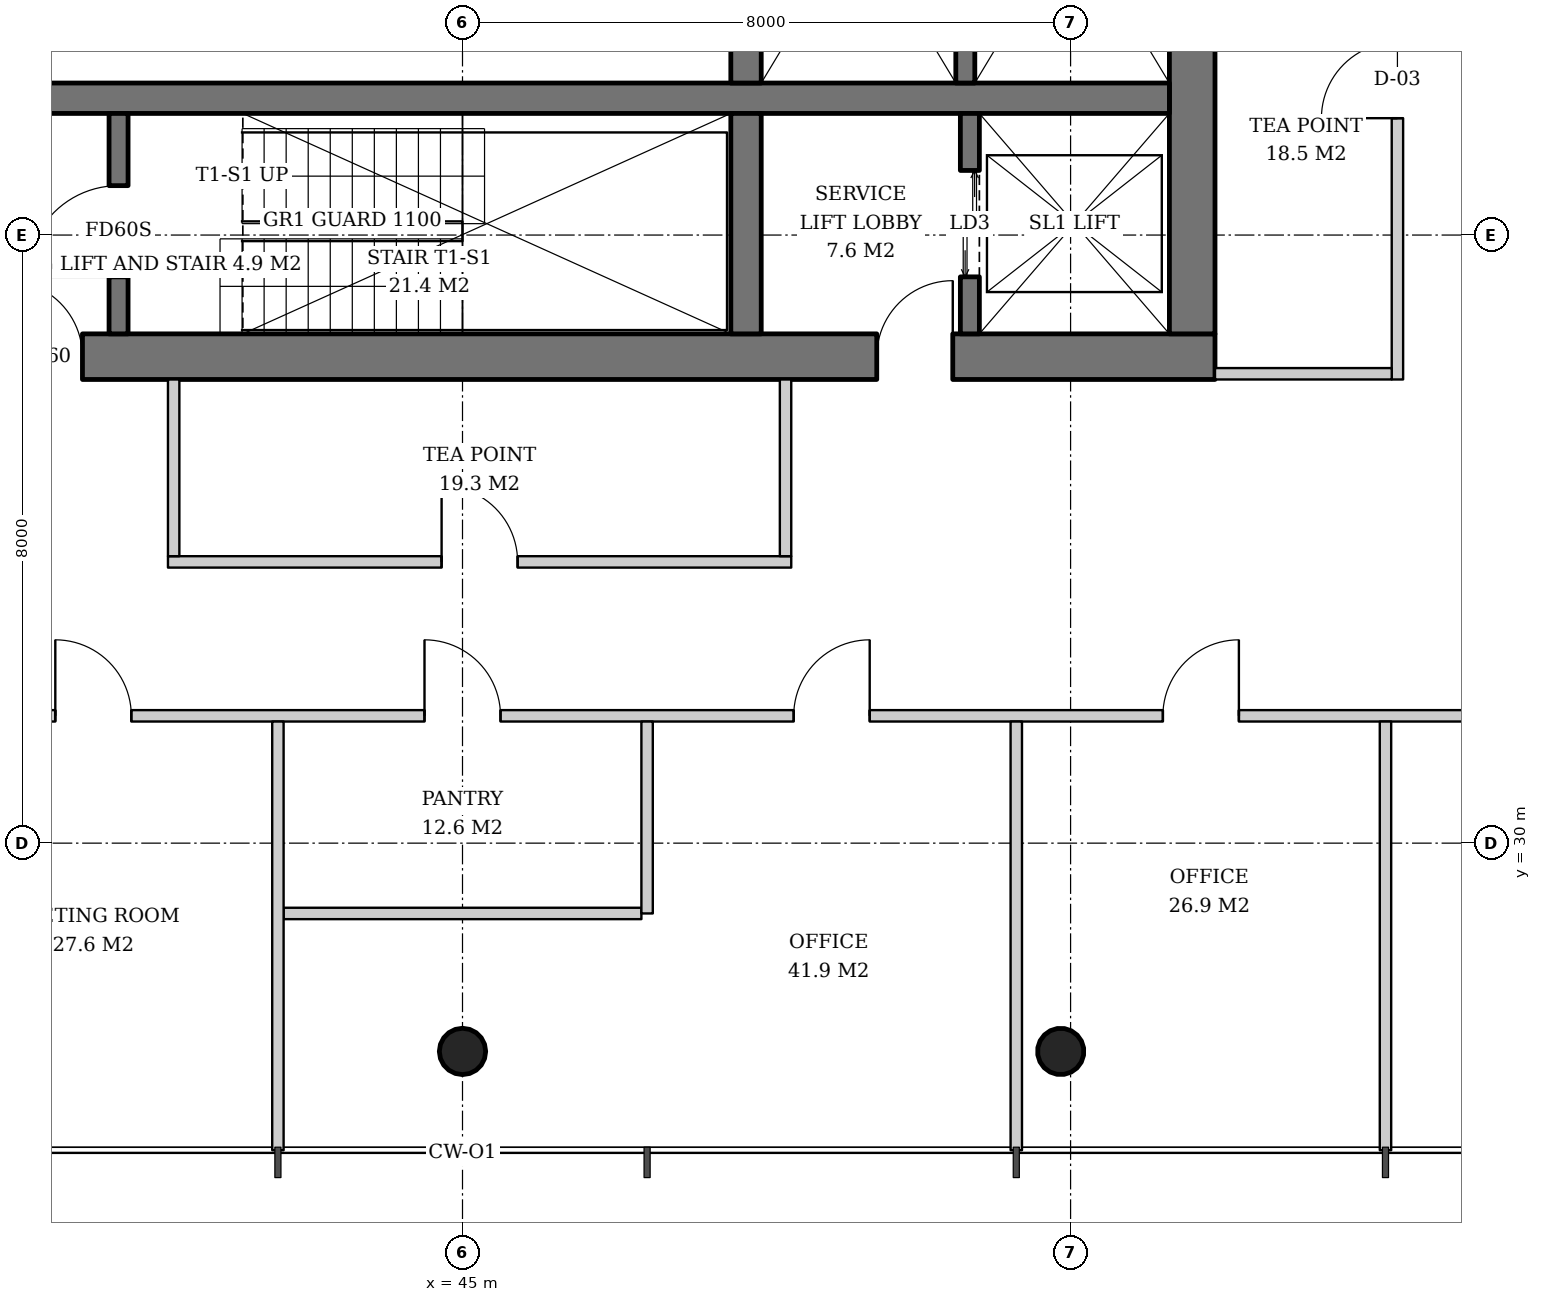
"""IFC4 building model, lengths in metres.
Left out: names, types, materials, properties, quantities, classifications, styles, units other than length and angle.
Written with IfcOpenShell. Run it as: python <this file> out.ifc"""

import sys

from ifc_helpers import new_model, si_unit, direction, frame, frame_2d, origin, origin_2d, place, context, subcontext, project, spatial, rectangle, hollow_circle, extrude, element, fill, save


model = new_model("IFC4")
c1 = context("Model", 3, precision=1e-05, world=origin(), true_north=direction((0.0, 1.0)))
c2 = subcontext(c1, "Body", "Model", "MODEL_VIEW")
j1 = project(units=[si_unit("LENGTHUNIT", "METRE"), si_unit("PLANEANGLEUNIT", "RADIAN")], contexts=[c1])
p1 = place(None, origin())
s1 = spatial("IfcSite", under=j1, at=p1, CompositionType="ELEMENT")
p2 = place(p1, origin())
s2 = spatial("IfcBuilding", under=s1, at=p2, CompositionType="ELEMENT")
p3 = place(p2, frame((0.0, 0.0, 184.4)))
s3 = spatial("IfcBuildingStorey", under=s2, at=p3, CompositionType="ELEMENT", Elevation=184.4)
p4 = place(p3, frame((45.0, 27.221, 0.0), z_axis=(0.0, 0.031914348339, 0.999490607445), x_axis=(-1.0, 0.0, 0.0)))
e1 = element("IfcColumn", 1, at=p4, inside=s3, PredefinedType="COLUMN", context=c2, shape_type="SweptSolid", body=[
    extrude(hollow_circle(Radius=0.305, WallThickness=0.025, at=origin_2d()), origin(), (0.0, 0.0, 1.0), 3.802),
])
p5 = place(p3, frame((52.889, 27.221, 0.0), z_axis=(-0.015987237665, 0.031910269556, 0.999362868496), x_axis=(-0.894067115991, -0.447933021895, 0.0)))
e2 = element("IfcColumn", 2, at=p5, inside=s3, PredefinedType="COLUMN", context=c2, shape_type="SweptSolid", body=[
    extrude(hollow_circle(Radius=0.305, WallThickness=0.025, at=origin_2d()), origin(), (0.0, 0.0, 1.0), 3.802),
])
p6 = place(p3, frame((35.1, 36.4, 0.0), z_axis=(0.0, 0.0, 1.0), x_axis=(1.0, 0.0, 0.0)))
e3 = element("IfcWall", 3, at=p6, inside=s3, PredefinedType="SHEAR", context=c2, shape_type="SweptSolid", body=[
    extrude(rectangle(XDim=19.8, YDim=0.6, at=frame_2d((9.9, 0.0))), origin(), (0.0, 0.0, 1.0), 3.8),
])
p7 = place(p6, frame((3.9, 0.0, 0.0)))
e4 = element("IfcOpeningElement", 4, at=p7, cuts=e3, PredefinedType="OPENING", context=c2, shape_type="SweptSolid", body=[
    extrude(rectangle(XDim=1.0, YDim=2.1, at=frame_2d((0.5, 1.05))), frame((0.0, 0.31, 0.0), z_axis=(0.0, -1.0, 0.0), x_axis=(1.0, 0.0, 0.0)), (0.0, 0.0, 1.0), 0.62),
])
p8 = place(p6, frame((15.35, 0.0, 0.0)))
e5 = element("IfcOpeningElement", 5, at=p8, cuts=e3, PredefinedType="OPENING", context=c2, shape_type="SweptSolid", body=[
    extrude(rectangle(XDim=1.0, YDim=2.1, at=frame_2d((0.5, 1.05))), frame((0.0, 0.31, 0.0), z_axis=(0.0, -1.0, 0.0), x_axis=(1.0, 0.0, 0.0)), (0.0, 0.0, 1.0), 0.62),
])
p9 = place(p3, frame((54.6, 36.7, 0.0), z_axis=(0.0, 0.0, 1.0), x_axis=(0.0, 1.0, 0.0)))
e6 = element("IfcWall", 6, at=p9, inside=s3, PredefinedType="SHEAR", context=c2, shape_type="SweptSolid", body=[
    extrude(rectangle(XDim=18.6, YDim=0.6, at=frame_2d((9.3, 0.0))), origin(), (0.0, 0.0, 1.0), 3.8),
])
p10 = place(p9, frame((8.4, 0.0, 0.0)))
e7 = element("IfcOpeningElement", 7, at=p10, cuts=e6, PredefinedType="OPENING", context=c2, shape_type="SweptSolid", body=[
    extrude(rectangle(XDim=1.8, YDim=2.4, at=frame_2d((0.9, 1.2))), frame((0.0, 0.31, 0.0), z_axis=(0.0, -1.0, 0.0), x_axis=(1.0, 0.0, 0.0)), (0.0, 0.0, 1.0), 0.62),
])
p11 = place(p3, frame((35.7, 39.8, 0.0), z_axis=(0.0, 0.0, 1.0), x_axis=(1.0, 0.0, 0.0)))
e8 = element("IfcWall", 8, at=p11, inside=s3, PredefinedType="SHEAR", context=c2, shape_type="SweptSolid", body=[
    extrude(rectangle(XDim=18.6, YDim=0.4, at=frame_2d((9.3, 0.0))), origin(), (0.0, 0.0, 1.0), 3.8),
])
p12 = place(p3, frame((48.73, 36.7, 0.0), z_axis=(0.0, 0.0, 1.0), x_axis=(0.0, 1.0, 0.0)))
e9 = element("IfcWall", 9, at=p12, inside=s3, PredefinedType="SHEAR", context=c2, shape_type="SweptSolid", body=[
    extrude(rectangle(XDim=2.9, YDim=0.4, at=frame_2d((1.45, 0.0))), origin(), (0.0, 0.0, 1.0), 3.8),
])
p13 = place(p3, frame((48.73, 40.0, 0.0), z_axis=(0.0, 0.0, 1.0), x_axis=(0.0, 1.0, 0.0)))
e10 = element("IfcWall", 10, at=p13, inside=s3, PredefinedType="SHEAR", context=c2, shape_type="SweptSolid", body=[
    extrude(rectangle(XDim=12.0, YDim=0.4, at=frame_2d((6.0, 0.0))), origin(), (0.0, 0.0, 1.0), 3.8),
])
p14 = place(p3, frame((40.475, 36.7, 0.0), z_axis=(0.0, 0.0, 1.0), x_axis=(0.0, 1.0, 0.0)))
e11 = element("IfcWall", 11, at=p14, inside=s3, PredefinedType="SHEAR", context=c2, shape_type="SweptSolid", body=[
    extrude(rectangle(XDim=2.9, YDim=0.25, at=frame_2d((1.45, 0.0))), origin(), (0.0, 0.0, 1.0), 3.8),
])
p15 = place(p14, frame((0.75, 0.0, 0.0)))
e12 = element("IfcOpeningElement", 12, at=p15, cuts=e11, PredefinedType="OPENING", context=c2, shape_type="SweptSolid", body=[
    extrude(rectangle(XDim=1.2, YDim=2.1, at=frame_2d((0.6, 1.05))), frame((0.0, 0.135, 0.0), z_axis=(0.0, -1.0, 0.0), x_axis=(1.0, 0.0, 0.0)), (0.0, 0.0, 1.0), 0.27),
])
p16 = place(p3, frame((51.675, 36.7, 0.0), z_axis=(0.0, 0.0, 1.0), x_axis=(0.0, 1.0, 0.0)))
e13 = element("IfcWall", 13, at=p16, inside=s3, PredefinedType="SHEAR", context=c2, shape_type="SweptSolid", body=[
    extrude(rectangle(XDim=2.9, YDim=0.25, at=frame_2d((1.45, 0.0))), origin(), (0.0, 0.0, 1.0), 3.8),
])
p17 = place(p16, frame((0.75, 0.0, 0.0)))
e14 = element("IfcOpeningElement", 14, at=p17, cuts=e13, PredefinedType="OPENING", context=c2, shape_type="SweptSolid", body=[
    extrude(rectangle(XDim=1.4, YDim=2.4, at=frame_2d((0.7, 1.2))), frame((0.0, 0.135, 0.0), z_axis=(0.0, -1.0, 0.0), x_axis=(1.0, 0.0, 0.0)), (0.0, 0.0, 1.0), 0.27),
])
p18 = place(p3, frame((51.615, 44.25, 0.0), z_axis=(0.0, 0.0, 1.0), x_axis=(0.0, -1.0, 0.0)))
e15 = element("IfcWall", 15, at=p18, inside=s3, PredefinedType="SHEAR", context=c2, shape_type="SweptSolid", body=[
    extrude(rectangle(XDim=4.25, YDim=0.25, at=frame_2d((2.125, 0.0))), origin(), (0.0, 0.0, 1.0), 3.8),
])
p19 = place(p3, frame((57.3, 36.1, 0.0), z_axis=(0.0, 0.0, 1.0), x_axis=(0.0, 1.0, 0.0)))
e16 = element("IfcWall", 16, at=p19, inside=s3, PredefinedType="PARTITIONING", context=c2, shape_type="SweptSolid", body=[
    extrude(rectangle(XDim=7.875, YDim=0.15, at=frame_2d((3.938, 0.0))), origin(), (0.0, 0.0, 1.0), 2.867),
])
p20 = place(p19, frame((3.438, 0.0, 0.0)))
e17 = element("IfcOpeningElement", 17, at=p20, cuts=e16, PredefinedType="OPENING", context=c2, shape_type="SweptSolid", body=[
    extrude(rectangle(XDim=1.0, YDim=2.1, at=frame_2d((0.5, 1.05))), frame((0.0, 0.085, 0.0), z_axis=(0.0, -1.0, 0.0), x_axis=(1.0, 0.0, 0.0)), (0.0, 0.0, 1.0), 0.17),
])
p21 = place(p3, frame((54.9, 36.175, 0.0), z_axis=(0.0, 0.0, 1.0), x_axis=(1.0, 0.0, 0.0)))
e18 = element("IfcWall", 18, at=p21, inside=s3, PredefinedType="PARTITIONING", context=c2, shape_type="SweptSolid", body=[
    extrude(rectangle(XDim=2.325, YDim=0.15, at=frame_2d((1.163, 0.0))), origin(), (0.0, 0.0, 1.0), 2.867),
])
p22 = place(p3, frame((41.125, 33.7, 0.0), z_axis=(0.0, 0.0, 1.0), x_axis=(1.0, 0.0, 0.0)))
e19 = element("IfcWall", 19, at=p22, inside=s3, PredefinedType="PARTITIONING", context=c2, shape_type="SweptSolid", body=[
    extrude(rectangle(XDim=8.2, YDim=0.15, at=frame_2d((4.1, 0.0))), origin(), (0.0, 0.0, 1.0), 2.867),
])
p23 = place(p22, frame((3.6, 0.0, 0.0)))
e20 = element("IfcOpeningElement", 20, at=p23, cuts=e19, PredefinedType="OPENING", context=c2, shape_type="SweptSolid", body=[
    extrude(rectangle(XDim=1.0, YDim=2.1, at=frame_2d((0.5, 1.05))), frame((0.0, 0.085, 0.0), z_axis=(0.0, -1.0, 0.0), x_axis=(1.0, 0.0, 0.0)), (0.0, 0.0, 1.0), 0.17),
])
for number, where, z_axis, x_axis in (
    (21, (41.2, 36.1, 0.0), (0.0, 0.0, 1.0), (0.0, -1.0, 0.0)),
    (22, (49.25, 36.1, 0.0), (0.0, 0.0, 1.0), (0.0, -1.0, 0.0)),
):
    element("IfcWall", number, at=place(p3, frame(where, z_axis=z_axis, x_axis=x_axis)), inside=s3, PredefinedType="PARTITIONING", context=c2, shape_type="SweptSolid", body=[
        extrude(rectangle(XDim=2.325, YDim=0.15, at=frame_2d((1.163, 0.0))), origin(), (0.0, 0.0, 1.0), 3.62),
    ])
p24 = place(p3, frame((42.646, 29.075, 0.0), z_axis=(0.0, 0.0, 1.0), x_axis=(1.0, 0.0, 0.0)))
e23 = element("IfcWall", 23, at=p24, inside=s3, PredefinedType="PARTITIONING", context=c2, shape_type="SweptSolid", body=[
    extrude(rectangle(XDim=4.707, YDim=0.15, at=frame_2d((2.354, 0.0))), origin(), (0.0, 0.0, 1.0), 2.867),
])
p25 = place(p3, frame((31.7, 31.675, 0.0), z_axis=(0.0, 0.0, 1.0), x_axis=(1.0, 0.0, 0.0)))
e24 = element("IfcWall", 24, at=p25, inside=s3, PredefinedType="PARTITIONING", context=c2, shape_type="SweptSolid", body=[
    extrude(rectangle(XDim=26.6, YDim=0.15, at=frame_2d((13.3, 0.0))), origin(), (0.0, 0.0, 1.0), 2.867),
])
p26 = place(p25, frame((3.086, 0.0, 0.0)))
e25 = element("IfcOpeningElement", 25, at=p26, cuts=e24, PredefinedType="OPENING", context=c2, shape_type="SweptSolid", body=[
    extrude(rectangle(XDim=1.0, YDim=2.1, at=frame_2d((0.5, 1.05))), frame((0.0, 0.085, 0.0), z_axis=(0.0, -1.0, 0.0), x_axis=(1.0, 0.0, 0.0)), (0.0, 0.0, 1.0), 0.17),
])
p27 = place(p25, frame((7.943, 0.0, 0.0)))
e26 = element("IfcOpeningElement", 26, at=p27, cuts=e24, PredefinedType="OPENING", context=c2, shape_type="SweptSolid", body=[
    extrude(rectangle(XDim=1.0, YDim=2.1, at=frame_2d((0.5, 1.05))), frame((0.0, 0.085, 0.0), z_axis=(0.0, -1.0, 0.0), x_axis=(1.0, 0.0, 0.0)), (0.0, 0.0, 1.0), 0.17),
])
p28 = place(p25, frame((12.8, 0.0, 0.0)))
e27 = element("IfcOpeningElement", 27, at=p28, cuts=e24, PredefinedType="OPENING", context=c2, shape_type="SweptSolid", body=[
    extrude(rectangle(XDim=1.0, YDim=2.1, at=frame_2d((0.5, 1.05))), frame((0.0, 0.085, 0.0), z_axis=(0.0, -1.0, 0.0), x_axis=(1.0, 0.0, 0.0)), (0.0, 0.0, 1.0), 0.17),
])
p29 = place(p25, frame((17.657, 0.0, 0.0)))
e28 = element("IfcOpeningElement", 28, at=p29, cuts=e24, PredefinedType="OPENING", context=c2, shape_type="SweptSolid", body=[
    extrude(rectangle(XDim=1.0, YDim=2.1, at=frame_2d((0.5, 1.05))), frame((0.0, 0.085, 0.0), z_axis=(0.0, -1.0, 0.0), x_axis=(1.0, 0.0, 0.0)), (0.0, 0.0, 1.0), 0.17),
])
p30 = place(p25, frame((22.514, 0.0, 0.0)))
e29 = element("IfcOpeningElement", 29, at=p30, cuts=e24, PredefinedType="OPENING", context=c2, shape_type="SweptSolid", body=[
    extrude(rectangle(XDim=1.0, YDim=2.1, at=frame_2d((0.5, 1.05))), frame((0.0, 0.085, 0.0), z_axis=(0.0, -1.0, 0.0), x_axis=(1.0, 0.0, 0.0)), (0.0, 0.0, 1.0), 0.17),
])
p31 = place(p3, frame((42.572, 31.6, 0.0), z_axis=(0.0, 0.0, 1.0), x_axis=(0.0, -1.0, 0.0)))
e30 = element("IfcWall", 30, at=p31, inside=s3, PredefinedType="PARTITIONING", context=c2, shape_type="SweptSolid", body=[
    extrude(rectangle(XDim=5.64, YDim=0.15, at=frame_2d((2.82, 0.0))), origin(), (0.0, 0.0, 1.0), 3.12),
])
p32 = place(p3, frame((47.428, 31.6, 0.0), z_axis=(0.0, 0.0, 1.0), x_axis=(0.0, -1.0, 0.0)))
e31 = element("IfcWall", 31, at=p32, inside=s3, PredefinedType="PARTITIONING", context=c2, shape_type="SweptSolid", body=[
    extrude(rectangle(XDim=2.525, YDim=0.15, at=frame_2d((1.263, 0.0))), origin(), (0.0, 0.0, 1.0), 2.867),
])
for number, where, z_axis, x_axis in (
    (32, (52.286, 31.6, 0.0), (0.0, 0.0, 1.0), (0.0, -1.0, 0.0)),
    (33, (57.143, 31.6, 0.0), (0.0, 0.0, 1.0), (0.0, -1.0, 0.0)),
):
    element("IfcWall", number, at=place(p3, frame(where, z_axis=z_axis, x_axis=x_axis)), inside=s3, PredefinedType="PARTITIONING", context=c2, shape_type="SweptSolid", body=[
        extrude(rectangle(XDim=5.64, YDim=0.15, at=frame_2d((2.82, 0.0))), origin(), (0.0, 0.0, 1.0), 3.12),
    ])
p33 = place(p15, origin())
e34 = element("IfcDoor", 34, at=p33, inside=s3, OperationType="SINGLE_SWING_LEFT", PredefinedType="DOOR", context=c2, shape_type="SweptSolid", body=[
    extrude(rectangle(XDim=1.2, YDim=2.1, at=frame_2d((0.6, 1.05))), frame((0.0, 0.025, 0.0), z_axis=(0.0, -1.0, 0.0), x_axis=(1.0, 0.0, 0.0)), (0.0, 0.0, 1.0), 0.05),
])
fill(e12, e34)
p34 = place(p17, origin())
e35 = element("IfcDoor", 35, at=p34, inside=s3, OperationType="DOUBLE_DOOR_SLIDING", PredefinedType="DOOR", context=c2, shape_type="SweptSolid", body=[
    extrude(rectangle(XDim=1.4, YDim=2.4, at=frame_2d((0.7, 1.2))), frame((0.0, 0.025, 0.0), z_axis=(0.0, -1.0, 0.0), x_axis=(1.0, 0.0, 0.0)), (0.0, 0.0, 1.0), 0.05),
])
fill(e14, e35)
p35 = place(p7, origin())
e36 = element("IfcDoor", 36, at=p35, inside=s3, OperationType="SINGLE_SWING_LEFT", PredefinedType="DOOR", context=c2, shape_type="SweptSolid", body=[
    extrude(rectangle(XDim=1.0, YDim=2.1, at=frame_2d((0.5, 1.05))), frame((0.0, 0.025, 0.0), z_axis=(0.0, -1.0, 0.0), x_axis=(1.0, 0.0, 0.0)), (0.0, 0.0, 1.0), 0.05),
])
fill(e4, e36)
p36 = place(p8, origin())
e37 = element("IfcDoor", 37, at=p36, inside=s3, OperationType="SINGLE_SWING_RIGHT", PredefinedType="DOOR", context=c2, shape_type="SweptSolid", body=[
    extrude(rectangle(XDim=1.0, YDim=2.1, at=frame_2d((0.5, 1.05))), frame((0.0, 0.025, 0.0), z_axis=(0.0, -1.0, 0.0), x_axis=(1.0, 0.0, 0.0)), (0.0, 0.0, 1.0), 0.05),
])
fill(e5, e37)
p37 = place(p20, origin())
e38 = element("IfcDoor", 38, at=p37, inside=s3, OperationType="SINGLE_SWING_LEFT", PredefinedType="DOOR", context=c2, shape_type="SweptSolid", body=[
    extrude(rectangle(XDim=1.0, YDim=2.1, at=frame_2d((0.5, 1.05))), frame((0.0, 0.025, 0.0), z_axis=(0.0, -1.0, 0.0), x_axis=(1.0, 0.0, 0.0)), (0.0, 0.0, 1.0), 0.05),
])
fill(e17, e38)
p38 = place(p23, origin())
e39 = element("IfcDoor", 39, at=p38, inside=s3, OperationType="SINGLE_SWING_LEFT", PredefinedType="DOOR", context=c2, shape_type="SweptSolid", body=[
    extrude(rectangle(XDim=1.0, YDim=2.1, at=frame_2d((0.5, 1.05))), frame((0.0, 0.025, 0.0), z_axis=(0.0, -1.0, 0.0), x_axis=(1.0, 0.0, 0.0)), (0.0, 0.0, 1.0), 0.05),
])
fill(e20, e39)
p39 = place(p27, origin())
e40 = element("IfcDoor", 40, at=p39, inside=s3, OperationType="SINGLE_SWING_LEFT", PredefinedType="DOOR", context=c2, shape_type="SweptSolid", body=[
    extrude(rectangle(XDim=1.0, YDim=2.1, at=frame_2d((0.5, 1.05))), frame((0.0, 0.025, 0.0), z_axis=(0.0, -1.0, 0.0), x_axis=(1.0, 0.0, 0.0)), (0.0, 0.0, 1.0), 0.05),
])
fill(e26, e40)
p40 = place(p28, origin())
e41 = element("IfcDoor", 41, at=p40, inside=s3, OperationType="SINGLE_SWING_LEFT", PredefinedType="DOOR", context=c2, shape_type="SweptSolid", body=[
    extrude(rectangle(XDim=1.0, YDim=2.1, at=frame_2d((0.5, 1.05))), frame((0.0, 0.025, 0.0), z_axis=(0.0, -1.0, 0.0), x_axis=(1.0, 0.0, 0.0)), (0.0, 0.0, 1.0), 0.05),
])
fill(e27, e41)
p41 = place(p29, origin())
e42 = element("IfcDoor", 42, at=p41, inside=s3, OperationType="SINGLE_SWING_RIGHT", PredefinedType="DOOR", context=c2, shape_type="SweptSolid", body=[
    extrude(rectangle(XDim=1.0, YDim=2.1, at=frame_2d((0.5, 1.05))), frame((0.0, 0.025, 0.0), z_axis=(0.0, -1.0, 0.0), x_axis=(1.0, 0.0, 0.0)), (0.0, 0.0, 1.0), 0.05),
])
fill(e28, e42)
p42 = place(p30, origin())
e43 = element("IfcDoor", 43, at=p42, inside=s3, OperationType="SINGLE_SWING_RIGHT", PredefinedType="DOOR", context=c2, shape_type="SweptSolid", body=[
    extrude(rectangle(XDim=1.0, YDim=2.1, at=frame_2d((0.5, 1.05))), frame((0.0, 0.025, 0.0), z_axis=(0.0, -1.0, 0.0), x_axis=(1.0, 0.0, 0.0)), (0.0, 0.0, 1.0), 0.05),
])
fill(e29, e43)
save(model, sys.argv[1])
